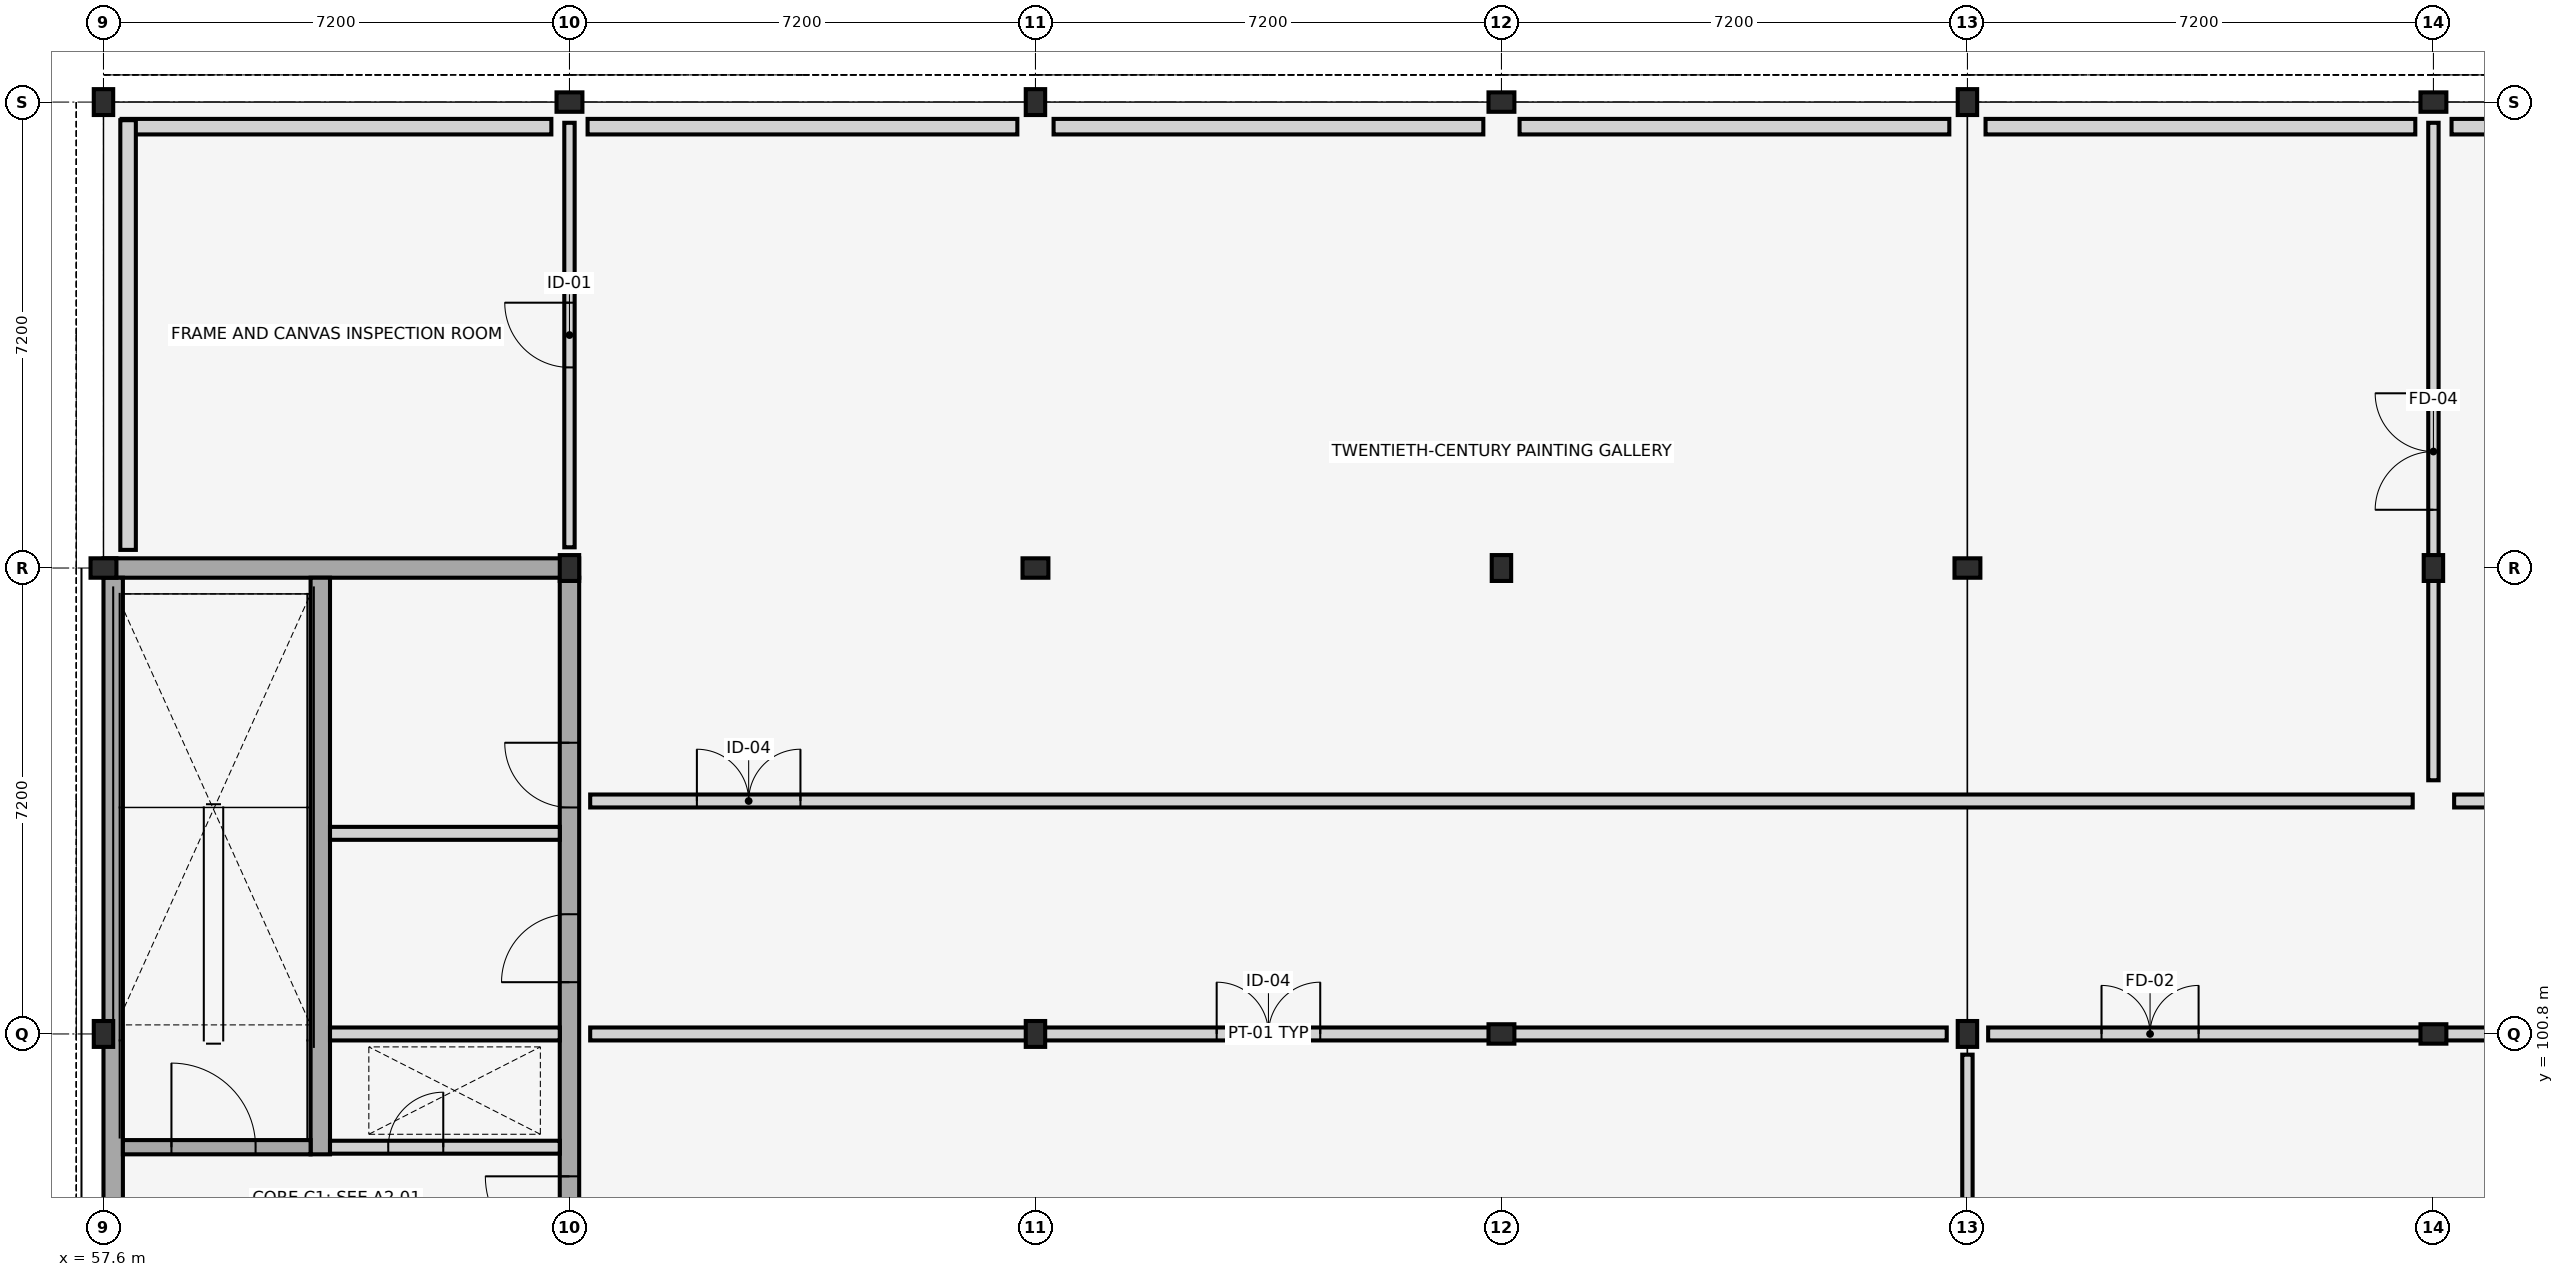
"""IFC4 building model, lengths in metres.
Left out: names, types, materials, properties, quantities, classifications, styles, units other than length and angle.
Written with IfcOpenShell. Run it as: python <this file> out.ifc"""

import sys

from ifc_helpers import new_model, si_unit, direction, frame, frame_2d, origin, origin_2d, place, context, subcontext, project, spatial, rectangle, i_section, extrude, element, fill, save


model = new_model("IFC4")
c1 = context("Model", 3, precision=1e-05, world=origin(), true_north=direction((0.0, 1.0)))
c2 = subcontext(c1, "Body", "Model", "MODEL_VIEW")
j1 = project(units=[si_unit("LENGTHUNIT", "METRE"), si_unit("PLANEANGLEUNIT", "RADIAN")], contexts=[c1])
p1 = place(None, origin())
s1 = spatial("IfcSite", under=j1, at=p1, CompositionType="ELEMENT")
p2 = place(p1, origin())
s2 = spatial("IfcBuilding", under=s1, at=p2, CompositionType="ELEMENT")
p3 = place(p2, frame((0.0, 0.0, 8.7)))
s3 = spatial("IfcBuildingStorey", under=s2, at=p3, CompositionType="ELEMENT", Elevation=8.7)
for number, where, z_axis, x_axis in (
    (1, (57.6, 100.8, 0.0), (0.0, 0.0, 1.0), (1.0, 0.0, 0.0)),
    (2, (57.6, 108.0, 0.0), (0.0, 0.0, 1.0), (0.0, 1.0, 0.0)),
    (3, (57.6, 115.2, 0.0), (0.0, 0.0, 1.0), (1.0, 0.0, 0.0)),
    (4, (64.8, 108.0, 0.0), (0.0, 0.0, 1.0), (1.0, 0.0, 0.0)),
    (5, (64.8, 115.2, 0.0), (0.0, 0.0, 1.0), (0.0, 1.0, 0.0)),
    (6, (72.0, 100.8, 0.0), (0.0, 0.0, 1.0), (1.0, 0.0, 0.0)),
    (7, (72.0, 108.0, 0.0), (0.0, 0.0, 1.0), (0.0, 1.0, 0.0)),
    (8, (72.0, 115.2, 0.0), (0.0, 0.0, 1.0), (1.0, 0.0, 0.0)),
    (9, (79.2, 100.8, 0.0), (0.0, 0.0, 1.0), (0.0, 1.0, 0.0)),
    (10, (79.2, 108.0, 0.0), (0.0, 0.0, 1.0), (1.0, 0.0, 0.0)),
    (11, (79.2, 115.2, 0.0), (0.0, 0.0, 1.0), (0.0, 1.0, 0.0)),
    (12, (86.4, 100.8, 0.0), (0.0, 0.0, 1.0), (1.0, 0.0, 0.0)),
    (13, (86.4, 108.0, 0.0), (0.0, 0.0, 1.0), (0.0, 1.0, 0.0)),
    (14, (86.4, 115.2, 0.0), (0.0, 0.0, 1.0), (1.0, 0.0, 0.0)),
    (15, (93.6, 100.8, 0.0), (0.0, 0.0, 1.0), (0.0, 1.0, 0.0)),
    (16, (93.6, 108.0, 0.0), (0.0, 0.0, 1.0), (1.0, 0.0, 0.0)),
    (17, (93.6, 115.2, 0.0), (0.0, 0.0, 1.0), (0.0, 1.0, 0.0)),
):
    element("IfcColumn", number, at=place(p3, frame(where, z_axis=z_axis, x_axis=x_axis)), inside=s3, PredefinedType="COLUMN", context=c2, shape_type="SweptSolid", body=[
        extrude(i_section(OverallWidth=0.3, OverallDepth=0.4, WebThickness=0.013, FlangeThickness=0.024, FilletRadius=0.027, at=origin_2d()), origin(), (0.0, 0.0, 1.0), 4.2),
    ])
for number, where, z_axis, x_axis in (
    (18, (100.52, 114.82, 0.0), (0.0, 0.0, 1.0), (-1.0, 0.0, 0.0)),
    (19, (93.32, 114.82, 0.0), (0.0, 0.0, 1.0), (-1.0, 0.0, 0.0)),
    (20, (86.12, 114.82, 0.0), (0.0, 0.0, 1.0), (-1.0, 0.0, 0.0)),
):
    element("IfcWall", number, at=place(p3, frame(where, z_axis=z_axis, x_axis=x_axis)), inside=s3, PredefinedType="STANDARD", context=c2, shape_type="SweptSolid", body=[
        extrude(rectangle(XDim=6.64, YDim=0.24, at=frame_2d((3.32, 0.0))), origin(), (0.0, 0.0, 1.0), 3.56),
    ])
for number, where, z_axis, x_axis in (
    (21, (78.92, 114.82, 0.0), (0.0, 0.0, 1.0), (-1.0, 0.0, 0.0)),
    (22, (71.72, 114.82, 0.0), (0.0, 0.0, 1.0), (-1.0, 0.0, 0.0)),
):
    element("IfcWall", number, at=place(p3, frame(where, z_axis=z_axis, x_axis=x_axis)), inside=s3, PredefinedType="STANDARD", context=c2, shape_type="SweptSolid", body=[
        extrude(rectangle(XDim=6.64, YDim=0.24, at=frame_2d((3.32, 0.0))), origin(), (0.0, 0.0, 1.0), 3.56),
    ])
p4 = place(p3, frame((64.52, 114.82, 0.0), z_axis=(0.0, 0.0, 1.0), x_axis=(-1.0, 0.0, 0.0)))
e23 = element("IfcWall", 23, at=p4, inside=s3, PredefinedType="STANDARD", context=c2, shape_type="SweptSolid", body=[
    extrude(rectangle(XDim=6.64, YDim=0.24, at=frame_2d((3.32, 0.0))), origin(), (0.0, 0.0, 1.0), 3.56),
])
p5 = place(p3, frame((57.98, 114.92, 0.0), z_axis=(0.0, 0.0, 1.0), x_axis=(0.0, -1.0, 0.0)))
e24 = element("IfcWall", 24, at=p5, inside=s3, PredefinedType="STANDARD", context=c2, shape_type="SweptSolid", body=[
    extrude(rectangle(XDim=6.64, YDim=0.24, at=frame_2d((3.32, 0.0))), origin(), (0.0, 0.0, 1.0), 3.56),
])
p6 = place(p3, frame((57.6, 108.0, 0.0), z_axis=(0.0, 0.0, 1.0), x_axis=(1.0, 0.0, 0.0)))
e25 = element("IfcWall", 25, at=p6, inside=s3, PredefinedType="SHEAR", context=c2, shape_type="SweptSolid", body=[
    extrude(rectangle(XDim=7.35, YDim=0.3, at=frame_2d((3.675, 0.0))), origin(), (0.0, 0.0, 1.0), 3.96),
])
p7 = place(p3, frame((57.75, 93.75, 0.0), z_axis=(0.0, 0.0, 1.0), x_axis=(0.0, 1.0, 0.0)))
e26 = element("IfcWall", 26, at=p7, inside=s3, PredefinedType="SHEAR", context=c2, shape_type="SweptSolid", body=[
    extrude(rectangle(XDim=14.1, YDim=0.3, at=frame_2d((7.05, 0.0))), origin(), (0.0, 0.0, 1.0), 3.96),
])
p8 = place(p3, frame((64.8, 93.75, 0.0), z_axis=(0.0, 0.0, 1.0), x_axis=(0.0, 1.0, 0.0)))
e27 = element("IfcWall", 27, at=p8, inside=s3, PredefinedType="SHEAR", context=c2, shape_type="SweptSolid", body=[
    extrude(rectangle(XDim=14.1, YDim=0.3, at=frame_2d((7.05, 0.0))), origin(), (0.0, 0.0, 1.0), 3.96),
])
p9 = place(p8, frame((3.55, 0.0, 0.0)))
e28 = element("IfcOpeningElement", 28, at=p9, cuts=e27, PredefinedType="OPENING", context=c2, shape_type="SweptSolid", body=[
    extrude(rectangle(XDim=1.3, YDim=2.2, at=frame_2d((0.65, 1.1))), frame((0.0, 0.16, 0.0), z_axis=(0.0, -1.0, 0.0), x_axis=(1.0, 0.0, 0.0)), (0.0, 0.0, 1.0), 0.32),
])
p10 = place(p8, frame((7.85, 0.0, 0.0)))
e29 = element("IfcOpeningElement", 29, at=p10, cuts=e27, PredefinedType="OPENING", context=c2, shape_type="SweptSolid", body=[
    extrude(rectangle(XDim=1.05, YDim=2.15, at=frame_2d((0.525, 1.075))), frame((0.0, 0.16, 0.0), z_axis=(0.0, -1.0, 0.0), x_axis=(1.0, 0.0, 0.0)), (0.0, 0.0, 1.0), 0.32),
])
p11 = place(p8, frame((10.55, 0.0, 0.0)))
e30 = element("IfcOpeningElement", 30, at=p11, cuts=e27, PredefinedType="OPENING", context=c2, shape_type="SweptSolid", body=[
    extrude(rectangle(XDim=1.0, YDim=2.15, at=frame_2d((0.5, 1.075))), frame((0.0, 0.16, 0.0), z_axis=(0.0, -1.0, 0.0), x_axis=(1.0, 0.0, 0.0)), (0.0, 0.0, 1.0), 0.32),
])
p12 = place(p3, frame((60.95, 98.94, 0.0), z_axis=(0.0, 0.0, 1.0), x_axis=(0.0, 1.0, 0.0)))
e31 = element("IfcWall", 31, at=p12, inside=s3, PredefinedType="SHEAR", context=c2, shape_type="SweptSolid", body=[
    extrude(rectangle(XDim=8.91, YDim=0.3, at=frame_2d((4.455, 0.0))), origin(), (0.0, 0.0, 1.0), 3.96),
])
p13 = place(p3, frame((61.1, 99.05, 0.0), z_axis=(0.0, 0.0, 1.0), x_axis=(1.0, 0.0, 0.0)))
e32 = element("IfcWall", 32, at=p13, inside=s3, PredefinedType="PLUMBINGWALL", context=c2, shape_type="SweptSolid", body=[
    extrude(rectangle(XDim=3.55, YDim=0.2, at=frame_2d((1.775, 0.0))), origin(), (0.0, 0.0, 1.0), 3.38),
])
p14 = place(p13, frame((0.9, 0.0, 0.0)))
e33 = element("IfcOpeningElement", 33, at=p14, cuts=e32, PredefinedType="OPENING", context=c2, shape_type="SweptSolid", body=[
    extrude(rectangle(XDim=0.85, YDim=2.05, at=frame_2d((0.425, 1.025))), frame((0.0, 0.11, 0.0), z_axis=(0.0, -1.0, 0.0), x_axis=(1.0, 0.0, 0.0)), (0.0, 0.0, 1.0), 0.22),
])
p15 = place(p3, frame((57.9, 99.05, 0.0), z_axis=(0.0, 0.0, 1.0), x_axis=(1.0, 0.0, 0.0)))
e34 = element("IfcWall", 34, at=p15, inside=s3, PredefinedType="SHEAR", context=c2, shape_type="SweptSolid", body=[
    extrude(rectangle(XDim=2.9, YDim=0.22, at=frame_2d((1.45, 0.0))), origin(), (0.0, 0.0, 1.0), 3.96),
])
p16 = place(p15, frame((0.75, 0.0, 0.0)))
e35 = element("IfcOpeningElement", 35, at=p16, cuts=e34, PredefinedType="OPENING", context=c2, shape_type="SweptSolid", body=[
    extrude(rectangle(XDim=1.3, YDim=2.2, at=frame_2d((0.65, 1.1))), frame((0.0, 0.12, 0.0), z_axis=(0.0, -1.0, 0.0), x_axis=(1.0, 0.0, 0.0)), (0.0, 0.0, 1.0), 0.24),
])
for number, where, z_axis, x_axis in (
    (36, (61.1, 100.8, 0.0), (0.0, 0.0, 1.0), (1.0, 0.0, 0.0)),
    (37, (61.1, 103.9, 0.0), (0.0, 0.0, 1.0), (1.0, 0.0, 0.0)),
):
    element("IfcWall", number, at=place(p3, frame(where, z_axis=z_axis, x_axis=x_axis)), inside=s3, PredefinedType="PLUMBINGWALL", context=c2, shape_type="SweptSolid", body=[
        extrude(rectangle(XDim=3.55, YDim=0.2, at=frame_2d((1.775, 0.0))), origin(), (0.0, 0.0, 1.0), 3.38),
    ])
p17 = place(p3, frame((65.12, 100.8, 0.0), z_axis=(0.0, 0.0, 1.0), x_axis=(1.0, 0.0, 0.0)))
e38 = element("IfcWall", 38, at=p17, inside=s3, PredefinedType="PARTITIONING", context=c2, shape_type="SweptSolid", body=[
    extrude(rectangle(XDim=20.96, YDim=0.2, at=frame_2d((10.48, 0.0))), origin(), (0.0, 0.0, 1.0), 3.15),
])
p18 = place(p17, frame((9.68, 0.0, 0.0)))
e39 = element("IfcOpeningElement", 39, at=p18, cuts=e38, PredefinedType="OPENING", context=c2, shape_type="SweptSolid", body=[
    extrude(rectangle(XDim=1.6, YDim=2.35, at=frame_2d((0.8, 1.175))), frame((0.0, 0.11, 0.0), z_axis=(0.0, -1.0, 0.0), x_axis=(1.0, 0.0, 0.0)), (0.0, 0.0, 1.0), 0.22),
])
p19 = place(p3, frame((86.72, 100.8, 0.0), z_axis=(0.0, 0.0, 1.0), x_axis=(1.0, 0.0, 0.0)))
e40 = element("IfcWall", 40, at=p19, inside=s3, PredefinedType="PARTITIONING", context=c2, shape_type="SweptSolid", body=[
    extrude(rectangle(XDim=13.76, YDim=0.2, at=frame_2d((6.88, 0.0))), origin(), (0.0, 0.0, 1.0), 3.15),
])
p20 = place(p19, frame((1.752, 0.0, 0.0)))
e41 = element("IfcOpeningElement", 41, at=p20, cuts=e40, PredefinedType="OPENING", context=c2, shape_type="SweptSolid", body=[
    extrude(rectangle(XDim=1.5, YDim=2.25, at=frame_2d((0.75, 1.125))), frame((0.0, 0.11, 0.0), z_axis=(0.0, -1.0, 0.0), x_axis=(1.0, 0.0, 0.0)), (0.0, 0.0, 1.0), 0.22),
])
p21 = place(p3, frame((65.12, 104.4, 0.0), z_axis=(0.0, 0.0, 1.0), x_axis=(1.0, 0.0, 0.0)))
e42 = element("IfcWall", 42, at=p21, inside=s3, PredefinedType="PARTITIONING", context=c2, shape_type="SweptSolid", body=[
    extrude(rectangle(XDim=28.16, YDim=0.2, at=frame_2d((14.08, 0.0))), origin(), (0.0, 0.0, 1.0), 3.15),
])
p22 = place(p21, frame((1.649, 0.0, 0.0)))
e43 = element("IfcOpeningElement", 43, at=p22, cuts=e42, PredefinedType="OPENING", context=c2, shape_type="SweptSolid", body=[
    extrude(rectangle(XDim=1.6, YDim=2.35, at=frame_2d((0.8, 1.175))), frame((0.0, 0.11, 0.0), z_axis=(0.0, -1.0, 0.0), x_axis=(1.0, 0.0, 0.0)), (0.0, 0.0, 1.0), 0.22),
])
p23 = place(p3, frame((93.92, 104.4, 0.0), z_axis=(0.0, 0.0, 1.0), x_axis=(1.0, 0.0, 0.0)))
e44 = element("IfcWall", 44, at=p23, inside=s3, PredefinedType="PARTITIONING", context=c2, shape_type="SweptSolid", body=[
    extrude(rectangle(XDim=6.56, YDim=0.2, at=frame_2d((3.28, 0.0))), origin(), (0.0, 0.0, 1.0), 3.15),
])
p24 = place(p23, frame((2.48, 0.0, 0.0)))
e45 = element("IfcOpeningElement", 45, at=p24, cuts=e44, PredefinedType="OPENING", context=c2, shape_type="SweptSolid", body=[
    extrude(rectangle(XDim=1.6, YDim=2.35, at=frame_2d((0.8, 1.175))), frame((0.0, 0.11, 0.0), z_axis=(0.0, -1.0, 0.0), x_axis=(1.0, 0.0, 0.0)), (0.0, 0.0, 1.0), 0.22),
])
p25 = place(p3, frame((86.4, 86.72, 0.0), z_axis=(0.0, 0.0, 1.0), x_axis=(0.0, 1.0, 0.0)))
e46 = element("IfcWall", 46, at=p25, inside=s3, PredefinedType="PARTITIONING", context=c2, shape_type="SweptSolid", body=[
    extrude(rectangle(XDim=13.76, YDim=0.16, at=frame_2d((6.88, 0.0))), origin(), (0.0, 0.0, 1.0), 3.15),
])
p26 = place(p25, frame((1.427, 0.0, 0.0)))
e47 = element("IfcOpeningElement", 47, at=p26, cuts=e46, PredefinedType="OPENING", context=c2, shape_type="SweptSolid", body=[
    extrude(rectangle(XDim=2.15, YDim=2.65, at=frame_2d((1.075, 1.325))), frame((0.0, 0.09, 0.0), z_axis=(0.0, -1.0, 0.0), x_axis=(1.0, 0.0, 0.0)), (0.0, 0.0, 1.0), 0.18),
])
p27 = place(p3, frame((93.6, 104.72, 0.0), z_axis=(0.0, 0.0, 1.0), x_axis=(0.0, 1.0, 0.0)))
e48 = element("IfcWall", 48, at=p27, inside=s3, PredefinedType="PARTITIONING", context=c2, shape_type="SweptSolid", body=[
    extrude(rectangle(XDim=10.16, YDim=0.16, at=frame_2d((5.08, 0.0))), origin(), (0.0, 0.0, 1.0), 3.15),
])
p28 = place(p27, frame((4.18, 0.0, 0.0)))
e49 = element("IfcOpeningElement", 49, at=p28, cuts=e48, PredefinedType="OPENING", context=c2, shape_type="SweptSolid", body=[
    extrude(rectangle(XDim=1.8, YDim=2.4, at=frame_2d((0.9, 1.2))), frame((0.0, 0.09, 0.0), z_axis=(0.0, -1.0, 0.0), x_axis=(1.0, 0.0, 0.0)), (0.0, 0.0, 1.0), 0.18),
])
p29 = place(p3, frame((64.8, 108.32, 0.0), z_axis=(0.0, 0.0, 1.0), x_axis=(0.0, 1.0, 0.0)))
e50 = element("IfcWall", 50, at=p29, inside=s3, PredefinedType="PARTITIONING", context=c2, shape_type="SweptSolid", body=[
    extrude(rectangle(XDim=6.56, YDim=0.16, at=frame_2d((3.28, 0.0))), origin(), (0.0, 0.0, 1.0), 3.15),
])
p30 = place(p29, frame((2.78, 0.0, 0.0)))
e51 = element("IfcOpeningElement", 51, at=p30, cuts=e50, PredefinedType="OPENING", context=c2, shape_type="SweptSolid", body=[
    extrude(rectangle(XDim=1.0, YDim=2.15, at=frame_2d((0.5, 1.075))), frame((0.0, 0.09, 0.0), z_axis=(0.0, -1.0, 0.0), x_axis=(1.0, 0.0, 0.0)), (0.0, 0.0, 1.0), 0.18),
])
p31 = place(p9, origin())
e52 = element("IfcDoor", 52, at=p31, inside=s3, OperationType="SINGLE_SWING_RIGHT", PredefinedType="DOOR", context=c2, shape_type="SweptSolid", body=[
    extrude(rectangle(XDim=1.3, YDim=2.2, at=frame_2d((0.65, 1.1))), frame((0.0, 0.025, 0.0), z_axis=(0.0, -1.0, 0.0), x_axis=(1.0, 0.0, 0.0)), (0.0, 0.0, 1.0), 0.05),
])
fill(e28, e52)
p32 = place(p10, origin())
e53 = element("IfcDoor", 53, at=p32, inside=s3, OperationType="SINGLE_SWING_LEFT", PredefinedType="DOOR", context=c2, shape_type="SweptSolid", body=[
    extrude(rectangle(XDim=1.05, YDim=2.15, at=frame_2d((0.525, 1.075))), frame((0.0, 0.025, 0.0), z_axis=(0.0, -1.0, 0.0), x_axis=(1.0, 0.0, 0.0)), (0.0, 0.0, 1.0), 0.05),
])
fill(e29, e53)
p33 = place(p11, origin())
e54 = element("IfcDoor", 54, at=p33, inside=s3, OperationType="SINGLE_SWING_RIGHT", PredefinedType="DOOR", context=c2, shape_type="SweptSolid", body=[
    extrude(rectangle(XDim=1.0, YDim=2.15, at=frame_2d((0.5, 1.075))), frame((0.0, 0.025, 0.0), z_axis=(0.0, -1.0, 0.0), x_axis=(1.0, 0.0, 0.0)), (0.0, 0.0, 1.0), 0.05),
])
fill(e30, e54)
p34 = place(p14, origin())
e55 = element("IfcDoor", 55, at=p34, inside=s3, OperationType="SINGLE_SWING_RIGHT", PredefinedType="TRAPDOOR", context=c2, shape_type="SweptSolid", body=[
    extrude(rectangle(XDim=0.85, YDim=2.05, at=frame_2d((0.425, 1.025))), frame((0.0, 0.025, 0.0), z_axis=(0.0, -1.0, 0.0), x_axis=(1.0, 0.0, 0.0)), (0.0, 0.0, 1.0), 0.05),
])
fill(e33, e55)
p35 = place(p16, origin())
e56 = element("IfcDoor", 56, at=p35, inside=s3, OperationType="SINGLE_SWING_LEFT", PredefinedType="DOOR", context=c2, shape_type="SweptSolid", body=[
    extrude(rectangle(XDim=1.3, YDim=2.2, at=frame_2d((0.65, 1.1))), frame((0.0, 0.025, 0.0), z_axis=(0.0, -1.0, 0.0), x_axis=(1.0, 0.0, 0.0)), (0.0, 0.0, 1.0), 0.05),
])
fill(e35, e56)
p36 = place(p18, origin())
e57 = element("IfcDoor", 57, at=p36, inside=s3, OperationType="DOUBLE_DOOR_SINGLE_SWING", PredefinedType="DOOR", context=c2, shape_type="SweptSolid", body=[
    extrude(rectangle(XDim=1.6, YDim=2.35, at=frame_2d((0.8, 1.175))), frame((0.0, 0.025, 0.0), z_axis=(0.0, -1.0, 0.0), x_axis=(1.0, 0.0, 0.0)), (0.0, 0.0, 1.0), 0.05),
])
fill(e39, e57)
p37 = place(p20, origin())
e58 = element("IfcDoor", 58, at=p37, inside=s3, OperationType="DOUBLE_DOOR_SINGLE_SWING", PredefinedType="DOOR", context=c2, shape_type="SweptSolid", body=[
    extrude(rectangle(XDim=1.5, YDim=2.25, at=frame_2d((0.75, 1.125))), frame((0.0, 0.025, 0.0), z_axis=(0.0, -1.0, 0.0), x_axis=(1.0, 0.0, 0.0)), (0.0, 0.0, 1.0), 0.05),
])
fill(e41, e58)
p38 = place(p22, origin())
e59 = element("IfcDoor", 59, at=p38, inside=s3, OperationType="DOUBLE_DOOR_SINGLE_SWING", PredefinedType="DOOR", context=c2, shape_type="SweptSolid", body=[
    extrude(rectangle(XDim=1.6, YDim=2.35, at=frame_2d((0.8, 1.175))), frame((0.0, 0.025, 0.0), z_axis=(0.0, -1.0, 0.0), x_axis=(1.0, 0.0, 0.0)), (0.0, 0.0, 1.0), 0.05),
])
fill(e43, e59)
p39 = place(p28, origin())
e60 = element("IfcDoor", 60, at=p39, inside=s3, OperationType="DOUBLE_DOOR_SINGLE_SWING", PredefinedType="DOOR", context=c2, shape_type="SweptSolid", body=[
    extrude(rectangle(XDim=1.8, YDim=2.4, at=frame_2d((0.9, 1.2))), frame((0.0, 0.025, 0.0), z_axis=(0.0, -1.0, 0.0), x_axis=(1.0, 0.0, 0.0)), (0.0, 0.0, 1.0), 0.05),
])
fill(e49, e60)
p40 = place(p30, origin())
e61 = element("IfcDoor", 61, at=p40, inside=s3, OperationType="SINGLE_SWING_RIGHT", PredefinedType="DOOR", context=c2, shape_type="SweptSolid", body=[
    extrude(rectangle(XDim=1.0, YDim=2.15, at=frame_2d((0.5, 1.075))), frame((0.0, 0.025, 0.0), z_axis=(0.0, -1.0, 0.0), x_axis=(1.0, 0.0, 0.0)), (0.0, 0.0, 1.0), 0.05),
])
fill(e51, e61)
save(model, sys.argv[1])
